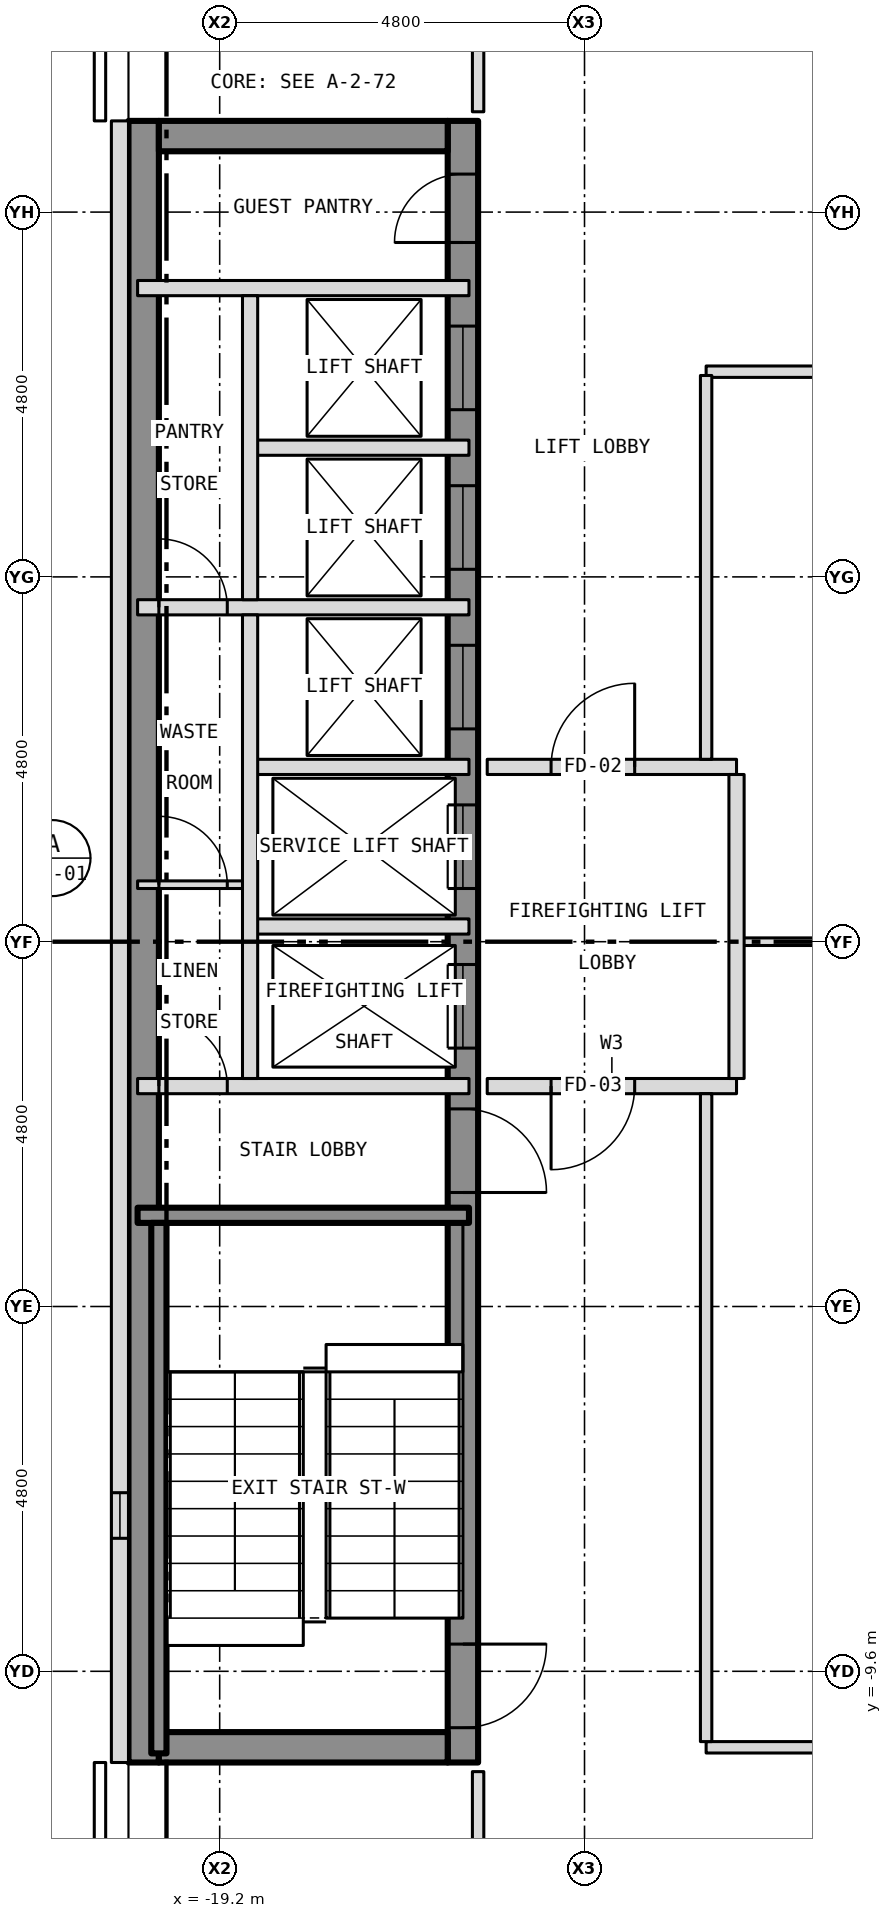
"""IFC4 building model, lengths in metres.
Left out: names, types, materials, properties, quantities, classifications, styles, units other than length and angle.
Written with IfcOpenShell. Run it as: python <this file> out.ifc"""

import sys

from ifc_helpers import new_model, si_unit, direction, frame, frame_2d, origin, place, context, subcontext, project, spatial, rectangle, extrude, element, fill, save


model = new_model("IFC4")
c1 = context("Model", 3, precision=1e-05, world=origin(), true_north=direction((0.0, 1.0)))
c2 = subcontext(c1, "Body", "Model", "MODEL_VIEW")
j1 = project(units=[si_unit("LENGTHUNIT", "METRE"), si_unit("PLANEANGLEUNIT", "RADIAN")], contexts=[c1])
p1 = place(None, origin())
s1 = spatial("IfcSite", under=j1, at=p1, CompositionType="ELEMENT")
p2 = place(p1, origin())
s2 = spatial("IfcBuilding", under=s1, at=p2, CompositionType="ELEMENT")
p3 = place(p2, frame((0.0, 0.0, 262.0)))
s3 = spatial("IfcBuildingStorey", under=s2, at=p3, CompositionType="ELEMENT", Elevation=262.0)
p4 = place(p3, frame((-16.0, -10.8, 0.0), z_axis=(0.0, 0.0, 1.0), x_axis=(0.0, 1.0, 0.0)))
e1 = element("IfcWall", 1, at=p4, inside=s3, PredefinedType="SHEAR", context=c2, shape_type="SweptSolid", body=[
    extrude(rectangle(XDim=21.6, YDim=0.4, at=frame_2d((10.8, 0.0))), origin(), (0.0, 0.0, 1.0), 3.25),
])
p5 = place(p4, frame((9.4, 0.0, 0.0)))
e2 = element("IfcOpeningElement", 2, at=p5, cuts=e1, PredefinedType="OPENING", context=c2, shape_type="SweptSolid", body=[
    extrude(rectangle(XDim=1.1, YDim=2.1, at=frame_2d((0.55, 1.05))), frame((0.0, 0.212, 0.0), z_axis=(0.0, -1.0, 0.0), x_axis=(1.0, 0.0, 0.0)), (0.0, 0.0, 1.0), 0.424),
])
p6 = place(p4, frame((11.5, 0.0, 0.0)))
e3 = element("IfcOpeningElement", 3, at=p6, cuts=e1, PredefinedType="OPENING", context=c2, shape_type="SweptSolid", body=[
    extrude(rectangle(XDim=1.1, YDim=2.1, at=frame_2d((0.55, 1.05))), frame((0.0, 0.212, 0.0), z_axis=(0.0, -1.0, 0.0), x_axis=(1.0, 0.0, 0.0)), (0.0, 0.0, 1.0), 0.424),
])
p7 = place(p4, frame((13.6, 0.0, 0.0)))
e4 = element("IfcOpeningElement", 4, at=p7, cuts=e1, PredefinedType="OPENING", context=c2, shape_type="SweptSolid", body=[
    extrude(rectangle(XDim=1.1, YDim=2.1, at=frame_2d((0.55, 1.05))), frame((0.0, 0.212, 0.0), z_axis=(0.0, -1.0, 0.0), x_axis=(1.0, 0.0, 0.0)), (0.0, 0.0, 1.0), 0.424),
])
p8 = place(p4, frame((15.7, 0.0, 0.0)))
e5 = element("IfcOpeningElement", 5, at=p8, cuts=e1, PredefinedType="OPENING", context=c2, shape_type="SweptSolid", body=[
    extrude(rectangle(XDim=1.1, YDim=2.1, at=frame_2d((0.55, 1.05))), frame((0.0, 0.212, 0.0), z_axis=(0.0, -1.0, 0.0), x_axis=(1.0, 0.0, 0.0)), (0.0, 0.0, 1.0), 0.424),
])
p9 = place(p4, frame((17.8, 0.0, 0.0)))
e6 = element("IfcOpeningElement", 6, at=p9, cuts=e1, PredefinedType="OPENING", context=c2, shape_type="SweptSolid", body=[
    extrude(rectangle(XDim=1.1, YDim=2.1, at=frame_2d((0.55, 1.05))), frame((0.0, 0.212, 0.0), z_axis=(0.0, -1.0, 0.0), x_axis=(1.0, 0.0, 0.0)), (0.0, 0.0, 1.0), 0.424),
])
p10 = place(p4, frame((0.458, 0.0, 0.0)))
e7 = element("IfcOpeningElement", 7, at=p10, cuts=e1, PredefinedType="OPENING", context=c2, shape_type="SweptSolid", body=[
    extrude(rectangle(XDim=1.1, YDim=2.1, at=frame_2d((0.55, 1.05))), frame((0.0, 0.212, 0.0), z_axis=(0.0, -1.0, 0.0), x_axis=(1.0, 0.0, 0.0)), (0.0, 0.0, 1.0), 0.424),
])
p11 = place(p4, frame((7.5, 0.0, 0.0)))
e8 = element("IfcOpeningElement", 8, at=p11, cuts=e1, PredefinedType="OPENING", context=c2, shape_type="SweptSolid", body=[
    extrude(rectangle(XDim=1.1, YDim=2.1, at=frame_2d((0.55, 1.05))), frame((0.0, 0.212, 0.0), z_axis=(0.0, -1.0, 0.0), x_axis=(1.0, 0.0, 0.0)), (0.0, 0.0, 1.0), 0.424),
])
p12 = place(p4, frame((20.0, 0.0, 0.0)))
e9 = element("IfcOpeningElement", 9, at=p12, cuts=e1, PredefinedType="OPENING", context=c2, shape_type="SweptSolid", body=[
    extrude(rectangle(XDim=0.9, YDim=2.1, at=frame_2d((0.45, 1.05))), frame((0.0, 0.212, 0.0), z_axis=(0.0, -1.0, 0.0), x_axis=(1.0, 0.0, 0.0)), (0.0, 0.0, 1.0), 0.424),
])
p13 = place(p3, frame((-20.2, -10.8, 0.0), z_axis=(0.0, 0.0, 1.0), x_axis=(0.0, 1.0, 0.0)))
e10 = element("IfcWall", 10, at=p13, inside=s3, PredefinedType="SHEAR", context=c2, shape_type="SweptSolid", body=[
    extrude(rectangle(XDim=21.6, YDim=0.4, at=frame_2d((10.8, 0.0))), origin(), (0.0, 0.0, 1.0), 3.25),
])
for number, where, z_axis, x_axis in (
    (11, (-20.0, 10.6, 0.0), (0.0, 0.0, 1.0), (1.0, 0.0, 0.0)),
    (12, (-20.0, -10.6, 0.0), (0.0, 0.0, 1.0), (1.0, 0.0, 0.0)),
):
    element("IfcWall", number, at=place(p3, frame(where, z_axis=z_axis, x_axis=x_axis)), inside=s3, PredefinedType="SHEAR", context=c2, shape_type="SweptSolid", body=[
        extrude(rectangle(XDim=3.8, YDim=0.4, at=frame_2d((1.9, 0.0))), origin(), (0.0, 0.0, 1.0), 3.25),
    ])
p14 = place(p3, frame((-20.512, 10.8, 0.0), z_axis=(0.0, 0.0, 1.0), x_axis=(0.0, -1.0, 0.0)))
e13 = element("IfcWall", 13, at=p14, inside=s3, PredefinedType="SOLIDWALL", context=c2, shape_type="SweptSolid", body=[
    extrude(rectangle(XDim=21.6, YDim=0.225, at=frame_2d((10.8, 0.0))), origin(), (0.0, 0.0, 1.0), 3.5),
])
p15 = place(p14, frame((18.05, 0.0, 1.0)))
e14 = element("IfcOpeningElement", 14, at=p15, cuts=e13, PredefinedType="OPENING", context=c2, shape_type="SweptSolid", body=[
    extrude(rectangle(XDim=0.6, YDim=1.5, at=frame_2d((0.3, 0.75))), frame((0.0, 0.125, 0.0), z_axis=(0.0, -1.0, 0.0), x_axis=(1.0, 0.0, 0.0)), (0.0, 0.0, 1.0), 0.249),
])
p16 = place(p3, frame((-12.8, -10.6, 0.0), z_axis=(0.0, 0.0, 1.0), x_axis=(1.0, 0.0, 0.0)))
e15 = element("IfcWall", 15, at=p16, inside=s3, PredefinedType="PARTITIONING", context=c2, shape_type="SweptSolid", body=[
    extrude(rectangle(XDim=18.7, YDim=0.15, at=frame_2d((9.35, 0.0))), origin(), (0.0, 0.0, 1.0), 3.25),
])
p17 = place(p16, frame((8.9, 0.0, 0.0)))
e16 = element("IfcOpeningElement", 16, at=p17, cuts=e15, PredefinedType="OPENING", context=c2, shape_type="SweptSolid", body=[
    extrude(rectangle(XDim=0.9, YDim=2.1, at=frame_2d((0.45, 1.05))), frame((0.0, 0.087, 0.0), z_axis=(0.0, -1.0, 0.0), x_axis=(1.0, 0.0, 0.0)), (0.0, 0.0, 1.0), 0.174),
])
p18 = place(p3, frame((-20.28, -3.6, 0.0), z_axis=(0.0, 0.0, 1.0), x_axis=(1.0, 0.0, 0.0)))
e17 = element("IfcWall", 17, at=p18, inside=s3, PredefinedType="SHEAR", context=c2, shape_type="SweptSolid", body=[
    extrude(rectangle(XDim=4.36, YDim=0.2, at=frame_2d((2.18, 0.0))), origin(), (0.0, 0.0, 1.0), 3.25),
])
p19 = place(p3, frame((-20.28, -1.9, 0.0), z_axis=(0.0, 0.0, 1.0), x_axis=(1.0, 0.0, 0.0)))
e18 = element("IfcWall", 18, at=p19, inside=s3, PredefinedType="PARTITIONING", context=c2, shape_type="SweptSolid", body=[
    extrude(rectangle(XDim=4.36, YDim=0.2, at=frame_2d((2.18, 0.0))), origin(), (0.0, 0.0, 1.0), 3.25),
])
p20 = place(p19, frame((0.28, 0.0, 0.0)))
e19 = element("IfcOpeningElement", 19, at=p20, cuts=e18, PredefinedType="OPENING", context=c2, shape_type="SweptSolid", body=[
    extrude(rectangle(XDim=0.9, YDim=2.1, at=frame_2d((0.45, 1.05))), frame((0.0, 0.112, 0.0), z_axis=(0.0, -1.0, 0.0), x_axis=(1.0, 0.0, 0.0)), (0.0, 0.0, 1.0), 0.224),
])
p21 = place(p3, frame((-15.68, -1.9, 0.0), z_axis=(0.0, 0.0, 1.0), x_axis=(1.0, 0.0, 0.0)))
e20 = element("IfcWall", 20, at=p21, inside=s3, PredefinedType="PARTITIONING", context=c2, shape_type="SweptSolid", body=[
    extrude(rectangle(XDim=3.28, YDim=0.2, at=frame_2d((1.64, 0.0))), origin(), (0.0, 0.0, 1.0), 3.25),
])
p22 = place(p21, frame((0.84, 0.0, 0.0)))
e21 = element("IfcOpeningElement", 21, at=p22, cuts=e20, PredefinedType="OPENING", context=c2, shape_type="SweptSolid", body=[
    extrude(rectangle(XDim=1.1, YDim=2.1, at=frame_2d((0.55, 1.05))), frame((0.0, 0.112, 0.0), z_axis=(0.0, -1.0, 0.0), x_axis=(1.0, 0.0, 0.0)), (0.0, 0.0, 1.0), 0.224),
])
p23 = place(p3, frame((-12.4, 0.0, 0.0), z_axis=(0.0, 0.0, 1.0), x_axis=(1.0, 0.0, 0.0)))
e22 = element("IfcWall", 22, at=p23, inside=s3, PredefinedType="PARTITIONING", context=c2, shape_type="SweptSolid", body=[
    extrude(rectangle(XDim=2.616, YDim=0.1, at=frame_2d((1.308, 0.0))), origin(), (0.0, 0.0, 1.0), 2.16),
])
p24 = place(p3, frame((-18.8, 0.2, 0.0), z_axis=(0.0, 0.0, 1.0), x_axis=(1.0, 0.0, 0.0)))
e23 = element("IfcWall", 23, at=p24, inside=s3, PredefinedType="PARTITIONING", context=c2, shape_type="SweptSolid", body=[
    extrude(rectangle(XDim=2.88, YDim=0.2, at=frame_2d((1.44, 0.0))), origin(), (0.0, 0.0, 1.0), 3.25),
])
p25 = place(p3, frame((-20.28, 0.75, 0.0), z_axis=(0.0, 0.0, 1.0), x_axis=(1.0, 0.0, 0.0)))
e24 = element("IfcWall", 24, at=p25, inside=s3, PredefinedType="PARTITIONING", context=c2, shape_type="SweptSolid", body=[
    extrude(rectangle(XDim=1.48, YDim=0.1, at=frame_2d((0.74, 0.0))), origin(), (0.0, 0.0, 1.0), 3.25),
])
p26 = place(p25, frame((0.28, 0.0, 0.0)))
e25 = element("IfcOpeningElement", 25, at=p26, cuts=e24, PredefinedType="OPENING", context=c2, shape_type="SweptSolid", body=[
    extrude(rectangle(XDim=0.9, YDim=2.1, at=frame_2d((0.45, 1.05))), frame((0.0, 0.062, 0.0), z_axis=(0.0, -1.0, 0.0), x_axis=(1.0, 0.0, 0.0)), (0.0, 0.0, 1.0), 0.124),
])
p27 = place(p3, frame((-18.8, 2.3, 0.0), z_axis=(0.0, 0.0, 1.0), x_axis=(1.0, 0.0, 0.0)))
e26 = element("IfcWall", 26, at=p27, inside=s3, PredefinedType="PARTITIONING", context=c2, shape_type="SweptSolid", body=[
    extrude(rectangle(XDim=2.88, YDim=0.2, at=frame_2d((1.44, 0.0))), origin(), (0.0, 0.0, 1.0), 3.25),
])
p28 = place(p3, frame((-15.68, 2.3, 0.0), z_axis=(0.0, 0.0, 1.0), x_axis=(1.0, 0.0, 0.0)))
e27 = element("IfcWall", 27, at=p28, inside=s3, PredefinedType="PARTITIONING", context=c2, shape_type="SweptSolid", body=[
    extrude(rectangle(XDim=3.28, YDim=0.2, at=frame_2d((1.64, 0.0))), origin(), (0.0, 0.0, 1.0), 3.25),
])
p29 = place(p28, frame((0.84, 0.0, 0.0)))
e28 = element("IfcOpeningElement", 28, at=p29, cuts=e27, PredefinedType="OPENING", context=c2, shape_type="SweptSolid", body=[
    extrude(rectangle(XDim=1.1, YDim=2.1, at=frame_2d((0.55, 1.05))), frame((0.0, 0.112, 0.0), z_axis=(0.0, -1.0, 0.0), x_axis=(1.0, 0.0, 0.0)), (0.0, 0.0, 1.0), 0.224),
])
p30 = place(p3, frame((-20.28, 4.4, 0.0), z_axis=(0.0, 0.0, 1.0), x_axis=(1.0, 0.0, 0.0)))
e29 = element("IfcWall", 29, at=p30, inside=s3, PredefinedType="PARTITIONING", context=c2, shape_type="SweptSolid", body=[
    extrude(rectangle(XDim=4.36, YDim=0.2, at=frame_2d((2.18, 0.0))), origin(), (0.0, 0.0, 1.0), 3.25),
])
p31 = place(p30, frame((0.28, 0.0, 0.0)))
e30 = element("IfcOpeningElement", 30, at=p31, cuts=e29, PredefinedType="OPENING", context=c2, shape_type="SweptSolid", body=[
    extrude(rectangle(XDim=0.9, YDim=2.1, at=frame_2d((0.45, 1.05))), frame((0.0, 0.112, 0.0), z_axis=(0.0, -1.0, 0.0), x_axis=(1.0, 0.0, 0.0)), (0.0, 0.0, 1.0), 0.224),
])
p32 = place(p3, frame((-18.8, 6.5, 0.0), z_axis=(0.0, 0.0, 1.0), x_axis=(1.0, 0.0, 0.0)))
e31 = element("IfcWall", 31, at=p32, inside=s3, PredefinedType="PARTITIONING", context=c2, shape_type="SweptSolid", body=[
    extrude(rectangle(XDim=2.88, YDim=0.2, at=frame_2d((1.44, 0.0))), origin(), (0.0, 0.0, 1.0), 3.25),
])
p33 = place(p3, frame((-12.8, 7.5, 0.0), z_axis=(0.0, 0.0, 1.0), x_axis=(1.0, 0.0, 0.0)))
e32 = element("IfcWall", 32, at=p33, inside=s3, PredefinedType="PARTITIONING", context=c2, shape_type="SweptSolid", body=[
    extrude(rectangle(XDim=18.7, YDim=0.15, at=frame_2d((9.35, 0.0))), origin(), (0.0, 0.0, 1.0), 3.25),
])
p34 = place(p33, frame((8.9, 0.0, 0.0)))
e33 = element("IfcOpeningElement", 33, at=p34, cuts=e32, PredefinedType="OPENING", context=c2, shape_type="SweptSolid", body=[
    extrude(rectangle(XDim=0.9, YDim=2.1, at=frame_2d((0.45, 1.05))), frame((0.0, 0.087, 0.0), z_axis=(0.0, -1.0, 0.0), x_axis=(1.0, 0.0, 0.0)), (0.0, 0.0, 1.0), 0.174),
])
p35 = place(p3, frame((-20.28, 8.6, 0.0), z_axis=(0.0, 0.0, 1.0), x_axis=(1.0, 0.0, 0.0)))
e34 = element("IfcWall", 34, at=p35, inside=s3, PredefinedType="PARTITIONING", context=c2, shape_type="SweptSolid", body=[
    extrude(rectangle(XDim=4.36, YDim=0.2, at=frame_2d((2.18, 0.0))), origin(), (0.0, 0.0, 1.0), 3.25),
])
p36 = place(p3, frame((-20.0, -10.68, 0.0), z_axis=(0.0, 0.0, 1.0), x_axis=(0.0, 1.0, 0.0)))
e35 = element("IfcWall", 35, at=p36, inside=s3, PredefinedType="SHEAR", context=c2, shape_type="SweptSolid", body=[
    extrude(rectangle(XDim=6.98, YDim=0.2, at=frame_2d((3.49, 0.0))), origin(), (0.0, 0.0, 1.0), 3.25),
])
p37 = place(p3, frame((-18.8, -1.8, 0.0), z_axis=(0.0, 0.0, 1.0), x_axis=(0.0, 1.0, 0.0)))
e36 = element("IfcWall", 36, at=p37, inside=s3, PredefinedType="PARTITIONING", context=c2, shape_type="SweptSolid", body=[
    extrude(rectangle(XDim=6.1, YDim=0.2, at=frame_2d((3.05, 0.0))), origin(), (0.0, 0.0, 1.0), 3.25),
])
p38 = place(p3, frame((-18.8, 4.5, 0.0), z_axis=(0.0, 0.0, 1.0), x_axis=(0.0, 1.0, 0.0)))
e37 = element("IfcWall", 37, at=p38, inside=s3, PredefinedType="PARTITIONING", context=c2, shape_type="SweptSolid", body=[
    extrude(rectangle(XDim=4.0, YDim=0.2, at=frame_2d((2.0, 0.0))), origin(), (0.0, 0.0, 1.0), 3.25),
])
for number, where, z_axis, x_axis in (
    (38, (-15.8, -12.725, 0.0), (0.0, 0.0, 1.0), (0.0, 1.0, 0.0)),
    (39, (-15.8, 10.92, 0.0), (0.0, 0.0, 1.0), (0.0, 1.0, 0.0)),
):
    element("IfcWall", number, at=place(p3, frame(where, z_axis=z_axis, x_axis=x_axis)), inside=s3, PredefinedType="PARTITIONING", context=c2, shape_type="SweptSolid", body=[
        extrude(rectangle(XDim=1.805, YDim=0.15, at=frame_2d((0.903, 0.0))), origin(), (0.0, 0.0, 1.0), 3.25),
    ])
p39 = place(p3, frame((-12.8, -10.525, 0.0), z_axis=(0.0, 0.0, 1.0), x_axis=(0.0, 1.0, 0.0)))
e40 = element("IfcWall", 40, at=p39, inside=s3, PredefinedType="PARTITIONING", context=c2, shape_type="SweptSolid", body=[
    extrude(rectangle(XDim=8.525, YDim=0.15, at=frame_2d((4.262, 0.0))), origin(), (0.0, 0.0, 1.0), 3.25),
])
p40 = place(p3, frame((-12.8, 2.4, 0.0), z_axis=(0.0, 0.0, 1.0), x_axis=(0.0, 1.0, 0.0)))
e41 = element("IfcWall", 41, at=p40, inside=s3, PredefinedType="PARTITIONING", context=c2, shape_type="SweptSolid", body=[
    extrude(rectangle(XDim=5.05, YDim=0.15, at=frame_2d((2.525, 0.0))), origin(), (0.0, 0.0, 1.0), 3.25),
])
p41 = place(p3, frame((-12.4, -1.8, 0.0), z_axis=(0.0, 0.0, 1.0), x_axis=(0.0, 1.0, 0.0)))
e42 = element("IfcWall", 42, at=p41, inside=s3, PredefinedType="PARTITIONING", context=c2, shape_type="SweptSolid", body=[
    extrude(rectangle(XDim=4.0, YDim=0.2, at=frame_2d((2.0, 0.0))), origin(), (0.0, 0.0, 1.0), 3.25),
])
p42 = place(p15, origin())
e43 = element("IfcWindow", 43, at=p42, inside=s3, PartitioningType="SINGLE_PANEL", PredefinedType="WINDOW", context=c2, shape_type="SweptSolid", body=[
    extrude(rectangle(XDim=0.6, YDim=1.5, at=frame_2d((0.3, 0.75))), frame((0.0, -0.022, 0.0), z_axis=(0.0, -1.0, 0.0), x_axis=(1.0, 0.0, 0.0)), (0.0, 0.0, 1.0), 0.06),
])
fill(e14, e43)
p43 = place(p5, origin())
e44 = element("IfcDoor", 44, at=p43, inside=s3, OperationType="SLIDING_TO_LEFT", PredefinedType="DOOR", context=c2, shape_type="SweptSolid", body=[
    extrude(rectangle(XDim=1.1, YDim=2.1, at=frame_2d((0.55, 1.05))), frame((0.0, 0.025, 0.0), z_axis=(0.0, -1.0, 0.0), x_axis=(1.0, 0.0, 0.0)), (0.0, 0.0, 1.0), 0.05),
])
fill(e2, e44)
p44 = place(p6, origin())
e45 = element("IfcDoor", 45, at=p44, inside=s3, OperationType="SLIDING_TO_LEFT", PredefinedType="DOOR", context=c2, shape_type="SweptSolid", body=[
    extrude(rectangle(XDim=1.1, YDim=2.1, at=frame_2d((0.55, 1.05))), frame((0.0, 0.025, 0.0), z_axis=(0.0, -1.0, 0.0), x_axis=(1.0, 0.0, 0.0)), (0.0, 0.0, 1.0), 0.05),
])
fill(e3, e45)
p45 = place(p7, origin())
e46 = element("IfcDoor", 46, at=p45, inside=s3, OperationType="SLIDING_TO_LEFT", PredefinedType="DOOR", context=c2, shape_type="SweptSolid", body=[
    extrude(rectangle(XDim=1.1, YDim=2.1, at=frame_2d((0.55, 1.05))), frame((0.0, 0.025, 0.0), z_axis=(0.0, -1.0, 0.0), x_axis=(1.0, 0.0, 0.0)), (0.0, 0.0, 1.0), 0.05),
])
fill(e4, e46)
p46 = place(p8, origin())
e47 = element("IfcDoor", 47, at=p46, inside=s3, OperationType="SLIDING_TO_LEFT", PredefinedType="DOOR", context=c2, shape_type="SweptSolid", body=[
    extrude(rectangle(XDim=1.1, YDim=2.1, at=frame_2d((0.55, 1.05))), frame((0.0, 0.025, 0.0), z_axis=(0.0, -1.0, 0.0), x_axis=(1.0, 0.0, 0.0)), (0.0, 0.0, 1.0), 0.05),
])
fill(e5, e47)
p47 = place(p9, origin())
e48 = element("IfcDoor", 48, at=p47, inside=s3, OperationType="SLIDING_TO_LEFT", PredefinedType="DOOR", context=c2, shape_type="SweptSolid", body=[
    extrude(rectangle(XDim=1.1, YDim=2.1, at=frame_2d((0.55, 1.05))), frame((0.0, 0.025, 0.0), z_axis=(0.0, -1.0, 0.0), x_axis=(1.0, 0.0, 0.0)), (0.0, 0.0, 1.0), 0.05),
])
fill(e6, e48)
p48 = place(p10, origin())
e49 = element("IfcDoor", 49, at=p48, inside=s3, OperationType="SINGLE_SWING_RIGHT", PredefinedType="DOOR", context=c2, shape_type="SweptSolid", body=[
    extrude(rectangle(XDim=1.1, YDim=2.1, at=frame_2d((0.55, 1.05))), frame((0.0, 0.025, 0.0), z_axis=(0.0, -1.0, 0.0), x_axis=(1.0, 0.0, 0.0)), (0.0, 0.0, 1.0), 0.05),
])
fill(e7, e49)
p49 = place(p11, origin())
e50 = element("IfcDoor", 50, at=p49, inside=s3, OperationType="SINGLE_SWING_LEFT", PredefinedType="DOOR", context=c2, shape_type="SweptSolid", body=[
    extrude(rectangle(XDim=1.1, YDim=2.1, at=frame_2d((0.55, 1.05))), frame((0.0, 0.025, 0.0), z_axis=(0.0, -1.0, 0.0), x_axis=(1.0, 0.0, 0.0)), (0.0, 0.0, 1.0), 0.05),
])
fill(e8, e50)
p50 = place(p12, origin())
e51 = element("IfcDoor", 51, at=p50, inside=s3, OperationType="SINGLE_SWING_LEFT", PredefinedType="DOOR", context=c2, shape_type="SweptSolid", body=[
    extrude(rectangle(XDim=0.9, YDim=2.1, at=frame_2d((0.45, 1.05))), frame((0.0, 0.025, 0.0), z_axis=(0.0, -1.0, 0.0), x_axis=(1.0, 0.0, 0.0)), (0.0, 0.0, 1.0), 0.05),
])
fill(e9, e51)
p51 = place(p20, origin())
e52 = element("IfcDoor", 52, at=p51, inside=s3, OperationType="SINGLE_SWING_LEFT", PredefinedType="DOOR", context=c2, shape_type="SweptSolid", body=[
    extrude(rectangle(XDim=0.9, YDim=2.1, at=frame_2d((0.45, 1.05))), frame((0.0, 0.025, 0.0), z_axis=(0.0, -1.0, 0.0), x_axis=(1.0, 0.0, 0.0)), (0.0, 0.0, 1.0), 0.05),
])
fill(e19, e52)
p52 = place(p26, origin())
e53 = element("IfcDoor", 53, at=p52, inside=s3, OperationType="SINGLE_SWING_LEFT", PredefinedType="DOOR", context=c2, shape_type="SweptSolid", body=[
    extrude(rectangle(XDim=0.9, YDim=2.1, at=frame_2d((0.45, 1.05))), frame((0.0, 0.025, 0.0), z_axis=(0.0, -1.0, 0.0), x_axis=(1.0, 0.0, 0.0)), (0.0, 0.0, 1.0), 0.05),
])
fill(e25, e53)
p53 = place(p31, origin())
e54 = element("IfcDoor", 54, at=p53, inside=s3, OperationType="SINGLE_SWING_LEFT", PredefinedType="DOOR", context=c2, shape_type="SweptSolid", body=[
    extrude(rectangle(XDim=0.9, YDim=2.1, at=frame_2d((0.45, 1.05))), frame((0.0, 0.025, 0.0), z_axis=(0.0, -1.0, 0.0), x_axis=(1.0, 0.0, 0.0)), (0.0, 0.0, 1.0), 0.05),
])
fill(e30, e54)
p54 = place(p29, origin())
e55 = element("IfcDoor", 55, at=p54, inside=s3, OperationType="SINGLE_SWING_RIGHT", PredefinedType="DOOR", context=c2, shape_type="SweptSolid", body=[
    extrude(rectangle(XDim=1.1, YDim=2.1, at=frame_2d((0.55, 1.05))), frame((0.0, 0.025, 0.0), z_axis=(0.0, -1.0, 0.0), x_axis=(1.0, 0.0, 0.0)), (0.0, 0.0, 1.0), 0.05),
])
fill(e28, e55)
p55 = place(p22, origin())
e56 = element("IfcDoor", 56, at=p55, inside=s3, OperationType="SINGLE_SWING_LEFT", PredefinedType="DOOR", context=c2, shape_type="SweptSolid", body=[
    extrude(rectangle(XDim=1.1, YDim=2.1, at=frame_2d((0.55, 1.05))), frame((0.0, 0.025, 0.0), z_axis=(0.0, -1.0, 0.0), x_axis=(1.0, 0.0, 0.0)), (0.0, 0.0, 1.0), 0.05),
])
fill(e21, e56)
save(model, sys.argv[1])
